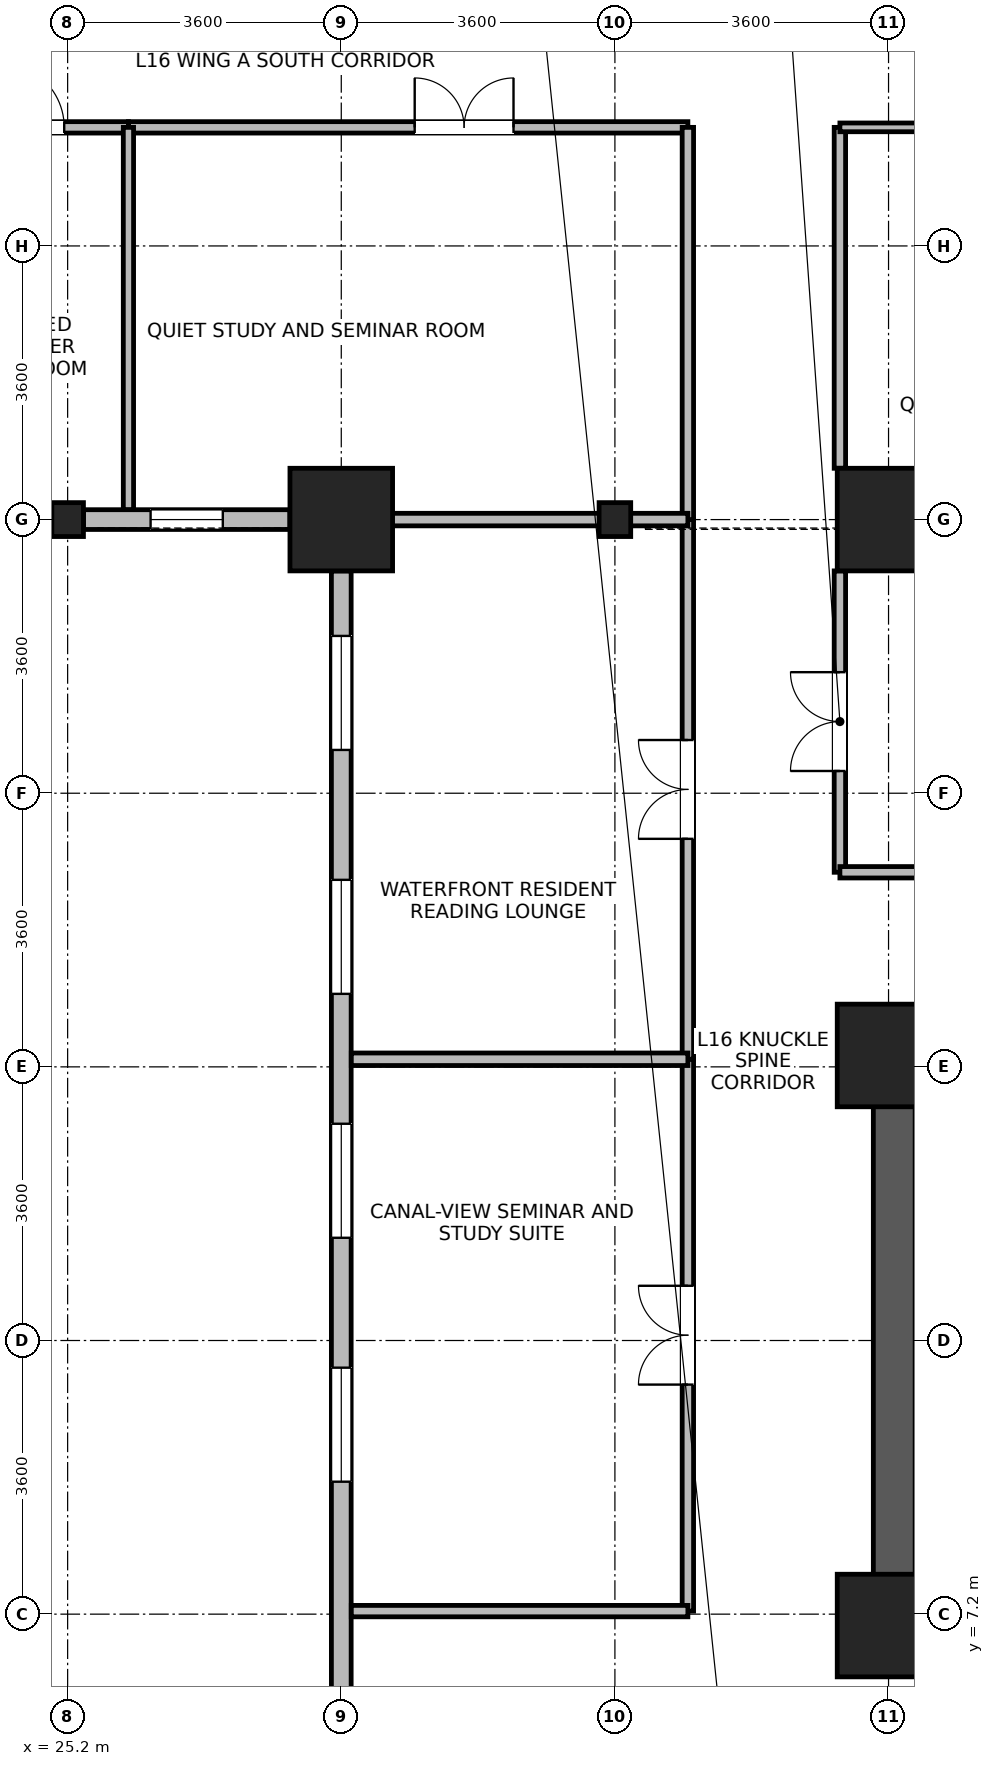
"""IFC4 building model, lengths in metres.
Left out: names, types, materials, properties, quantities, classifications, styles, units other than length and angle.
Written with IfcOpenShell. Run it as: python <this file> out.ifc"""

import sys

from ifc_helpers import new_model, si_unit, direction, frame, frame_2d, origin, origin_2d, place, context, subcontext, project, spatial, rectangle, i_section, extrude, source, transform, mapped, element, fill, save


model = new_model("IFC4")
c1 = context("Model", 3, precision=1e-05, world=origin(), true_north=direction((0.0, 1.0)))
c2 = subcontext(c1, "Body", "Model", "MODEL_VIEW")
j1 = project(units=[si_unit("LENGTHUNIT", "METRE"), si_unit("PLANEANGLEUNIT", "RADIAN")], contexts=[c1])
p1 = place(None, origin())
s1 = spatial("IfcSite", under=j1, at=p1, CompositionType="ELEMENT")
p2 = place(p1, origin())
s2 = spatial("IfcBuilding", under=s1, at=p2, CompositionType="ELEMENT")
p3 = place(p2, frame((0.0, 0.0, 66.0)))
s3 = spatial("IfcBuildingStorey", under=s2, at=p3, CompositionType="ELEMENT", Elevation=66.0)
p4 = place(p3, frame((36.075, 6.75, 0.0), z_axis=(0.0, 0.0, 1.0), x_axis=(0.0, 1.0, 0.0)))
e1 = element("IfcWall", 1, at=p4, inside=s3, PredefinedType="SHEAR", context=c2, shape_type="SweptSolid", body=[
    extrude(rectangle(XDim=8.1, YDim=0.55, at=frame_2d((4.05, 0.0))), origin(), (0.0, 0.0, 1.0), 3.45),
])
m1 = source(origin(), c2, "Body", "SweptSolid", [
    extrude(rectangle(XDim=1.35, YDim=1.35, at=origin_2d()), origin(), (0.0, 0.0, 1.0), 3.7),
])
for number, where, z_axis, x_axis in (
    (2, (28.8, 21.6, 0.0), (0.0, 0.0, 1.0), (1.0, 0.0, 0.0)),
    (3, (36.0, 21.6, 0.0), (0.0, 0.0, 1.0), (1.0, 0.0, 0.0)),
    (4, (36.0, 7.05, 0.0), (0.0, 0.0, 1.0), (1.0, 0.0, 0.0)),
    (5, (36.0, 14.55, 0.0), (0.0, 0.0, 1.0), (1.0, 0.0, 0.0)),
):
    element("IfcColumn", number, at=place(p3, frame(where, z_axis=z_axis, x_axis=x_axis)), inside=s3, PredefinedType="COLUMN", context=c2, shape_type="MappedRepresentation", body=[
        mapped(m1, transform((0.0, 0.0, 0.0), x_axis=(1.0, 0.0, 0.0), y_axis=(0.0, 1.0, 0.0), z_axis=(0.0, 0.0, 1.0), scale=1.0)),
    ])
m2 = source(origin(), c2, "Body", "SweptSolid", [
    extrude(i_section(OverallWidth=0.416, OverallDepth=0.446, WebThickness=0.029, FlangeThickness=0.04, FilletRadius=0.015, at=origin_2d()), origin(), (0.0, 0.0, 1.0), 3.7),
])
for number, where, z_axis, x_axis in (
    (6, (25.2, 21.6, 0.0), (0.0, 0.0, 1.0), (1.0, 0.0, 0.0)),
    (7, (32.4, 21.6, 0.0), (0.0, 0.0, 1.0), (1.0, 0.0, 0.0)),
):
    element("IfcColumn", number, at=place(p3, frame(where, z_axis=z_axis, x_axis=x_axis)), inside=s3, PredefinedType="COLUMN", context=c2, shape_type="MappedRepresentation", body=[
        mapped(m2, transform((0.0, 0.0, 0.0), x_axis=(1.0, 0.0, 0.0), y_axis=(0.0, 1.0, 0.0), z_axis=(0.0, 0.0, 1.0), scale=1.0)),
    ])
p5 = place(p3, frame((28.124, 21.6, 0.0), z_axis=(0.0, 0.0, 1.0), x_axis=(-1.0, 0.0, 0.0)))
e8 = element("IfcWall", 8, at=p5, inside=s3, PredefinedType="STANDARD", context=c2, shape_type="SweptSolid", body=[
    extrude(rectangle(XDim=2.715, YDim=0.26, at=frame_2d((1.357, 0.0))), origin(), (0.0, 0.0, 1.0), 2.93),
])
p6 = place(p5, frame((0.883, 0.0, 0.85)))
e9 = element("IfcOpeningElement", 9, at=p6, cuts=e8, PredefinedType="OPENING", context=c2, shape_type="SweptSolid", body=[
    extrude(rectangle(XDim=0.95, YDim=1.75, at=frame_2d((0.475, 0.875))), frame((0.0, 0.14, 0.0), z_axis=(0.0, -1.0, 0.0), x_axis=(1.0, 0.0, 0.0)), (0.0, 0.0, 1.0), 0.28),
])
p7 = place(p3, frame((28.8, 1.67, 0.0), z_axis=(0.0, 0.0, 1.0), x_axis=(0.0, 1.0, 0.0)))
e10 = element("IfcWall", 10, at=p7, inside=s3, PredefinedType="STANDARD", context=c2, shape_type="SweptSolid", body=[
    extrude(rectangle(XDim=19.254, YDim=0.26, at=frame_2d((9.627, 0.0))), origin(), (0.0, 0.0, 1.0), 3.43),
])
p8 = place(p7, frame((0.854, 0.0, 0.85)))
e11 = element("IfcOpeningElement", 11, at=p8, cuts=e10, PredefinedType="OPENING", context=c2, shape_type="SweptSolid", body=[
    extrude(rectangle(XDim=1.5, YDim=1.85, at=frame_2d((0.75, 0.925))), frame((0.0, 0.14, 0.0), z_axis=(0.0, -1.0, 0.0), x_axis=(1.0, 0.0, 0.0)), (0.0, 0.0, 1.0), 0.28),
])
p9 = place(p7, frame((7.272, 0.0, 0.85)))
e12 = element("IfcOpeningElement", 12, at=p9, cuts=e10, PredefinedType="OPENING", context=c2, shape_type="SweptSolid", body=[
    extrude(rectangle(XDim=1.5, YDim=1.85, at=frame_2d((0.75, 0.925))), frame((0.0, 0.14, 0.0), z_axis=(0.0, -1.0, 0.0), x_axis=(1.0, 0.0, 0.0)), (0.0, 0.0, 1.0), 0.28),
])
p10 = place(p7, frame((10.481, 0.0, 0.85)))
e13 = element("IfcOpeningElement", 13, at=p10, cuts=e10, PredefinedType="OPENING", context=c2, shape_type="SweptSolid", body=[
    extrude(rectangle(XDim=1.5, YDim=1.85, at=frame_2d((0.75, 0.925))), frame((0.0, 0.14, 0.0), z_axis=(0.0, -1.0, 0.0), x_axis=(1.0, 0.0, 0.0)), (0.0, 0.0, 1.0), 0.28),
])
p11 = place(p7, frame((13.69, 0.0, 0.85)))
e14 = element("IfcOpeningElement", 14, at=p11, cuts=e10, PredefinedType="OPENING", context=c2, shape_type="SweptSolid", body=[
    extrude(rectangle(XDim=1.5, YDim=1.85, at=frame_2d((0.75, 0.925))), frame((0.0, 0.14, 0.0), z_axis=(0.0, -1.0, 0.0), x_axis=(1.0, 0.0, 0.0)), (0.0, 0.0, 1.0), 0.28),
])
p12 = place(p7, frame((16.899, 0.0, 0.85)))
e15 = element("IfcOpeningElement", 15, at=p12, cuts=e10, PredefinedType="OPENING", context=c2, shape_type="SweptSolid", body=[
    extrude(rectangle(XDim=1.5, YDim=1.85, at=frame_2d((0.75, 0.925))), frame((0.0, 0.14, 0.0), z_axis=(0.0, -1.0, 0.0), x_axis=(1.0, 0.0, 0.0)), (0.0, 0.0, 1.0), 0.28),
])
p13 = place(p3, frame((35.36, 16.96, 0.0), z_axis=(0.0, 0.0, 1.0), x_axis=(0.0, 1.0, 0.0)))
e16 = element("IfcWall", 16, at=p13, inside=s3, PredefinedType="PARTITIONING", context=c2, shape_type="SweptSolid", body=[
    extrude(rectangle(XDim=3.965, YDim=0.15, at=frame_2d((1.982, 0.0))), origin(), (0.0, 0.0, 1.0), 3.43),
])
p14 = place(p13, frame((1.333, 0.0, 0.0)))
e17 = element("IfcOpeningElement", 17, at=p14, cuts=e16, PredefinedType="OPENING", context=c2, shape_type="SweptSolid", body=[
    extrude(rectangle(XDim=1.3, YDim=2.12, at=frame_2d((0.65, 1.06))), frame((0.0, 0.085, 0.0), z_axis=(0.0, -1.0, 0.0), x_axis=(1.0, 0.0, 0.0)), (0.0, 0.0, 1.0), 0.17),
])
p15 = place(p3, frame((35.36, 22.275, 0.0), z_axis=(0.0, 0.0, 1.0), x_axis=(0.0, 1.0, 0.0)))
e18 = element("IfcWall", 18, at=p15, inside=s3, PredefinedType="PARTITIONING", context=c2, shape_type="SweptSolid", body=[
    extrude(rectangle(XDim=4.485, YDim=0.15, at=frame_2d((2.243, 0.0))), origin(), (0.0, 0.0, 1.0), 3.43),
])
p16 = place(p3, frame((26.0, 26.76, 0.0), z_axis=(0.0, 0.0, 1.0), x_axis=(1.0, 0.0, 0.0)))
e19 = element("IfcWall", 19, at=p16, inside=s3, PredefinedType="PARTITIONING", context=c2, shape_type="SweptSolid", body=[
    extrude(rectangle(XDim=7.36, YDim=0.15, at=frame_2d((3.68, 0.0))), origin(), (0.0, 0.0, 1.0), 3.43),
])
p17 = place(p16, frame((3.766, 0.0, 0.0)))
e20 = element("IfcOpeningElement", 20, at=p17, cuts=e19, PredefinedType="OPENING", context=c2, shape_type="SweptSolid", body=[
    extrude(rectangle(XDim=1.3, YDim=2.12, at=frame_2d((0.65, 1.06))), frame((0.0, 0.085, 0.0), z_axis=(0.0, -1.0, 0.0), x_axis=(1.0, 0.0, 0.0)), (0.0, 0.0, 1.0), 0.17),
])
p18 = place(p3, frame((33.36, 7.24, 0.0), z_axis=(0.0, 0.0, 1.0), x_axis=(0.0, 1.0, 0.0)))
e21 = element("IfcWall", 21, at=p18, inside=s3, PredefinedType="PARTITIONING", context=c2, shape_type="SweptSolid", body=[
    extrude(rectangle(XDim=7.26, YDim=0.15, at=frame_2d((3.63, 0.0))), origin(), (0.0, 0.0, 1.0), 3.43),
])
p19 = place(p18, frame((2.98, 0.0, 0.0)))
e22 = element("IfcOpeningElement", 22, at=p19, cuts=e21, PredefinedType="OPENING", context=c2, shape_type="SweptSolid", body=[
    extrude(rectangle(XDim=1.3, YDim=2.12, at=frame_2d((0.65, 1.06))), frame((0.0, 0.085, 0.0), z_axis=(0.0, -1.0, 0.0), x_axis=(1.0, 0.0, 0.0)), (0.0, 0.0, 1.0), 0.17),
])
p20 = place(p3, frame((33.36, 14.5, 0.0), z_axis=(0.0, 0.0, 1.0), x_axis=(0.0, 1.0, 0.0)))
e23 = element("IfcWall", 23, at=p20, inside=s3, PredefinedType="PARTITIONING", context=c2, shape_type="SweptSolid", body=[
    extrude(rectangle(XDim=7.1, YDim=0.15, at=frame_2d((3.55, 0.0))), origin(), (0.0, 0.0, 1.0), 3.43),
])
p21 = place(p20, frame((2.9, 0.0, 0.0)))
e24 = element("IfcOpeningElement", 24, at=p21, cuts=e23, PredefinedType="OPENING", context=c2, shape_type="SweptSolid", body=[
    extrude(rectangle(XDim=1.3, YDim=2.12, at=frame_2d((0.65, 1.06))), frame((0.0, 0.085, 0.0), z_axis=(0.0, -1.0, 0.0), x_axis=(1.0, 0.0, 0.0)), (0.0, 0.0, 1.0), 0.17),
])
p22 = place(p3, frame((35.36, 16.96, 0.0), z_axis=(0.0, 0.0, 1.0), x_axis=(1.0, 0.0, 0.0)))
e25 = element("IfcWall", 25, at=p22, inside=s3, PredefinedType="PARTITIONING", context=c2, shape_type="SweptSolid", body=[
    extrude(rectangle(XDim=6.04, YDim=0.15, at=frame_2d((3.02, 0.0))), origin(), (0.0, 0.0, 1.0), 3.43),
])
p23 = place(p3, frame((33.36, 21.6, 0.0), z_axis=(0.0, 0.0, 1.0), x_axis=(0.0, 1.0, 0.0)))
e26 = element("IfcWall", 26, at=p23, inside=s3, PredefinedType="PARTITIONING", context=c2, shape_type="SweptSolid", body=[
    extrude(rectangle(XDim=5.16, YDim=0.15, at=frame_2d((2.58, 0.0))), origin(), (0.0, 0.0, 1.0), 3.43),
])
p24 = place(p3, frame((28.932, 7.24, 0.0), z_axis=(0.0, 0.0, 1.0), x_axis=(1.0, 0.0, 0.0)))
e27 = element("IfcWall", 27, at=p24, inside=s3, PredefinedType="PARTITIONING", context=c2, shape_type="SweptSolid", body=[
    extrude(rectangle(XDim=4.428, YDim=0.15, at=frame_2d((2.214, 0.0))), origin(), (0.0, 0.0, 1.0), 3.43),
])
p25 = place(p3, frame((23.46, 26.76, 0.0), z_axis=(0.0, 0.0, 1.0), x_axis=(1.0, 0.0, 0.0)))
e28 = element("IfcWall", 28, at=p25, inside=s3, PredefinedType="PARTITIONING", context=c2, shape_type="SweptSolid", body=[
    extrude(rectangle(XDim=2.54, YDim=0.15, at=frame_2d((1.27, 0.0))), origin(), (0.0, 0.0, 1.0), 3.43),
])
p26 = place(p25, frame((0.845, 0.0, 0.0)))
e29 = element("IfcOpeningElement", 29, at=p26, cuts=e28, PredefinedType="OPENING", context=c2, shape_type="SweptSolid", body=[
    extrude(rectangle(XDim=0.85, YDim=2.04, at=frame_2d((0.425, 1.02))), frame((0.0, 0.085, 0.0), z_axis=(0.0, -1.0, 0.0), x_axis=(1.0, 0.0, 0.0)), (0.0, 0.0, 1.0), 0.17),
])
p27 = place(p3, frame((35.36, 26.76, 0.0), z_axis=(0.0, 0.0, 1.0), x_axis=(1.0, 0.0, 0.0)))
e30 = element("IfcWall", 30, at=p27, inside=s3, PredefinedType="PARTITIONING", context=c2, shape_type="SweptSolid", body=[
    extrude(rectangle(XDim=6.04, YDim=0.115, at=frame_2d((3.02, 0.0))), origin(), (0.0, 0.0, 1.0), 3.43),
])
p28 = place(p3, frame((26.0, 21.732, 0.0), z_axis=(0.0, 0.0, 1.0), x_axis=(0.0, 1.0, 0.0)))
e31 = element("IfcWall", 31, at=p28, inside=s3, PredefinedType="PARTITIONING", context=c2, shape_type="SweptSolid", body=[
    extrude(rectangle(XDim=5.028, YDim=0.135, at=frame_2d((2.514, 0.0))), origin(), (0.0, 0.0, 1.0), 3.43),
])
p29 = place(p3, frame((28.932, 14.5, 0.0), z_axis=(0.0, 0.0, 1.0), x_axis=(1.0, 0.0, 0.0)))
e32 = element("IfcWall", 32, at=p29, inside=s3, PredefinedType="PARTITIONING", context=c2, shape_type="SweptSolid", body=[
    extrude(rectangle(XDim=4.428, YDim=0.165, at=frame_2d((2.214, 0.0))), origin(), (0.0, 0.0, 1.0), 3.43),
])
p30 = place(p3, frame((28.932, 21.6, 0.0), z_axis=(0.0, 0.0, 1.0), x_axis=(1.0, 0.0, 0.0)))
e33 = element("IfcWall", 33, at=p30, inside=s3, PredefinedType="PARTITIONING", context=c2, shape_type="SweptSolid", body=[
    extrude(rectangle(XDim=4.428, YDim=0.165, at=frame_2d((2.214, 0.0))), origin(), (0.0, 0.0, 1.0), 2.93),
])
p31 = place(p6, origin())
e34 = element("IfcWindow", 34, at=p31, inside=s3, PartitioningType="SINGLE_PANEL", PredefinedType="WINDOW", context=c2, shape_type="SweptSolid", body=[
    extrude(rectangle(XDim=0.95, YDim=1.75, at=frame_2d((0.475, 0.875))), frame((0.0, 0.03, 0.0), z_axis=(0.0, -1.0, 0.0), x_axis=(1.0, 0.0, 0.0)), (0.0, 0.0, 1.0), 0.06),
])
fill(e9, e34)
p32 = place(p9, origin())
e35 = element("IfcWindow", 35, at=p32, inside=s3, PartitioningType="SINGLE_PANEL", PredefinedType="WINDOW", context=c2, shape_type="SweptSolid", body=[
    extrude(rectangle(XDim=1.5, YDim=1.85, at=frame_2d((0.75, 0.925))), frame((0.0, 0.03, 0.0), z_axis=(0.0, -1.0, 0.0), x_axis=(1.0, 0.0, 0.0)), (0.0, 0.0, 1.0), 0.06),
])
fill(e12, e35)
p33 = place(p10, origin())
e36 = element("IfcWindow", 36, at=p33, inside=s3, PartitioningType="SINGLE_PANEL", PredefinedType="WINDOW", context=c2, shape_type="SweptSolid", body=[
    extrude(rectangle(XDim=1.5, YDim=1.85, at=frame_2d((0.75, 0.925))), frame((0.0, 0.03, 0.0), z_axis=(0.0, -1.0, 0.0), x_axis=(1.0, 0.0, 0.0)), (0.0, 0.0, 1.0), 0.06),
])
fill(e13, e36)
p34 = place(p11, origin())
e37 = element("IfcWindow", 37, at=p34, inside=s3, PartitioningType="SINGLE_PANEL", PredefinedType="WINDOW", context=c2, shape_type="SweptSolid", body=[
    extrude(rectangle(XDim=1.5, YDim=1.85, at=frame_2d((0.75, 0.925))), frame((0.0, 0.03, 0.0), z_axis=(0.0, -1.0, 0.0), x_axis=(1.0, 0.0, 0.0)), (0.0, 0.0, 1.0), 0.06),
])
fill(e14, e37)
p35 = place(p12, origin())
e38 = element("IfcWindow", 38, at=p35, inside=s3, PartitioningType="SINGLE_PANEL", PredefinedType="WINDOW", context=c2, shape_type="SweptSolid", body=[
    extrude(rectangle(XDim=1.5, YDim=1.85, at=frame_2d((0.75, 0.925))), frame((0.0, 0.03, 0.0), z_axis=(0.0, -1.0, 0.0), x_axis=(1.0, 0.0, 0.0)), (0.0, 0.0, 1.0), 0.06),
])
fill(e15, e38)
p36 = place(p14, origin())
e39 = element("IfcDoor", 39, at=p36, inside=s3, OperationType="DOUBLE_DOOR_SINGLE_SWING", PredefinedType="DOOR", context=c2, shape_type="SweptSolid", body=[
    extrude(rectangle(XDim=1.3, YDim=2.12, at=frame_2d((0.65, 1.06))), frame((0.0, 0.025, 0.0), z_axis=(0.0, -1.0, 0.0), x_axis=(1.0, 0.0, 0.0)), (0.0, 0.0, 1.0), 0.05),
])
fill(e17, e39)
p37 = place(p17, origin())
e40 = element("IfcDoor", 40, at=p37, inside=s3, OperationType="DOUBLE_DOOR_SINGLE_SWING", PredefinedType="DOOR", context=c2, shape_type="SweptSolid", body=[
    extrude(rectangle(XDim=1.3, YDim=2.12, at=frame_2d((0.65, 1.06))), frame((0.0, 0.025, 0.0), z_axis=(0.0, -1.0, 0.0), x_axis=(1.0, 0.0, 0.0)), (0.0, 0.0, 1.0), 0.05),
])
fill(e20, e40)
p38 = place(p19, origin())
e41 = element("IfcDoor", 41, at=p38, inside=s3, OperationType="DOUBLE_DOOR_SINGLE_SWING", PredefinedType="DOOR", context=c2, shape_type="SweptSolid", body=[
    extrude(rectangle(XDim=1.3, YDim=2.12, at=frame_2d((0.65, 1.06))), frame((0.0, 0.025, 0.0), z_axis=(0.0, -1.0, 0.0), x_axis=(1.0, 0.0, 0.0)), (0.0, 0.0, 1.0), 0.05),
])
fill(e22, e41)
p39 = place(p21, origin())
e42 = element("IfcDoor", 42, at=p39, inside=s3, OperationType="DOUBLE_DOOR_SINGLE_SWING", PredefinedType="DOOR", context=c2, shape_type="SweptSolid", body=[
    extrude(rectangle(XDim=1.3, YDim=2.12, at=frame_2d((0.65, 1.06))), frame((0.0, 0.025, 0.0), z_axis=(0.0, -1.0, 0.0), x_axis=(1.0, 0.0, 0.0)), (0.0, 0.0, 1.0), 0.05),
])
fill(e24, e42)
p40 = place(p26, origin())
e43 = element("IfcDoor", 43, at=p40, inside=s3, OperationType="SINGLE_SWING_LEFT", PredefinedType="DOOR", context=c2, shape_type="SweptSolid", body=[
    extrude(rectangle(XDim=0.85, YDim=2.04, at=frame_2d((0.425, 1.02))), frame((0.0, 0.025, 0.0), z_axis=(0.0, -1.0, 0.0), x_axis=(1.0, 0.0, 0.0)), (0.0, 0.0, 1.0), 0.05),
])
fill(e29, e43)
save(model, sys.argv[1])
